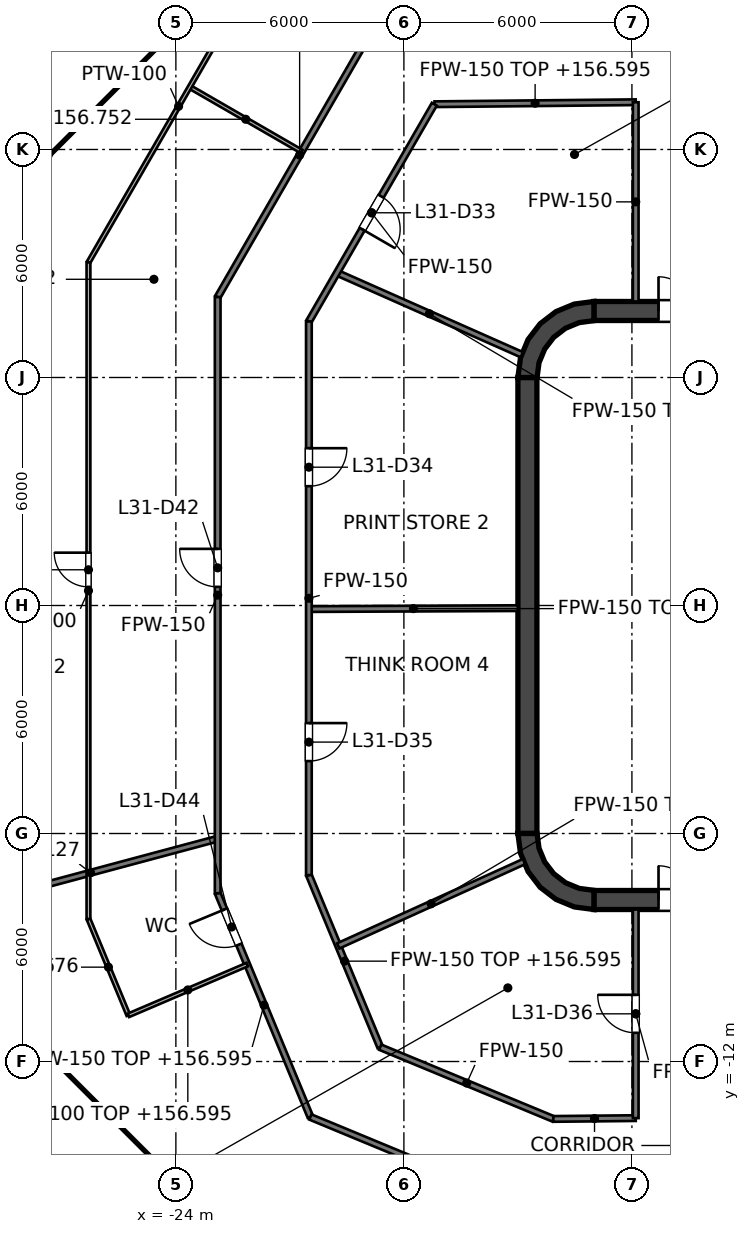
"""IFC4 building model, lengths in metres.
Left out: names, types, materials, properties, quantities, classifications, styles, units other than length and angle.
Written with IfcOpenShell. Run it as: python <this file> out.ifc"""

import sys

from ifc_helpers import new_model, si_unit, direction, frame, frame_2d, origin, place, context, subcontext, project, spatial, polyline, rectangle, outline, extrude, element, fill, save


model = new_model("IFC4")
c1 = context("Model", 3, precision=1e-05, world=origin(), true_north=direction((0.0, 1.0)))
c2 = subcontext(c1, "Body", "Model", "MODEL_VIEW")
j1 = project(units=[si_unit("LENGTHUNIT", "METRE"), si_unit("PLANEANGLEUNIT", "RADIAN")], contexts=[c1])
p1 = place(None, origin())
s1 = spatial("IfcSite", under=j1, at=p1, CompositionType="ELEMENT")
p2 = place(p1, origin())
s2 = spatial("IfcBuilding", under=s1, at=p2, CompositionType="ELEMENT")
p3 = place(p2, frame((0.0, 0.0, 153.6)))
s3 = spatial("IfcBuildingStorey", under=s2, at=p3, CompositionType="ELEMENT", Elevation=153.6)
p4 = place(p3, frame((-13.0, 7.75, 0.0), z_axis=(0.0, 0.0, 1.0), x_axis=(1.0, 0.0, 0.0)))
e1 = element("IfcWall", 1, at=p4, inside=s3, PredefinedType="SHEAR", context=c2, shape_type="SweptSolid", body=[
    extrude(rectangle(XDim=26.0, YDim=0.5, at=frame_2d((13.0, 0.0))), origin(), (0.0, 0.0, 1.0), 4.0),
])
p5 = place(p4, frame((1.7, 0.0, 0.0)))
e2 = element("IfcOpeningElement", 2, at=p5, cuts=e1, PredefinedType="OPENING", context=c2, shape_type="SweptSolid", body=[
    extrude(rectangle(XDim=1.8, YDim=2.1, at=frame_2d((0.9, 1.05))), frame((0.0, 0.25, 0.0), z_axis=(0.0, -1.0, 0.0), x_axis=(1.0, 0.0, 0.0)), (0.0, 0.0, 1.0), 0.5),
])
p6 = place(p4, frame((22.5, 0.0, 0.0)))
e3 = element("IfcOpeningElement", 3, at=p6, cuts=e1, PredefinedType="OPENING", context=c2, shape_type="SweptSolid", body=[
    extrude(rectangle(XDim=1.8, YDim=2.1, at=frame_2d((0.9, 1.05))), frame((0.0, 0.25, 0.0), z_axis=(0.0, -1.0, 0.0), x_axis=(1.0, 0.0, 0.0)), (0.0, 0.0, 1.0), 0.5),
])
p7 = place(p3, frame((-13.0, -7.75, 0.0), z_axis=(0.0, 0.0, 1.0), x_axis=(1.0, 0.0, 0.0)))
e4 = element("IfcWall", 4, at=p7, inside=s3, PredefinedType="SHEAR", context=c2, shape_type="SweptSolid", body=[
    extrude(rectangle(XDim=26.0, YDim=0.5, at=frame_2d((13.0, 0.0))), origin(), (0.0, 0.0, 1.0), 4.0),
])
p8 = place(p7, frame((1.7, 0.0, 0.0)))
e5 = element("IfcOpeningElement", 5, at=p8, cuts=e4, PredefinedType="OPENING", context=c2, shape_type="SweptSolid", body=[
    extrude(rectangle(XDim=1.8, YDim=2.1, at=frame_2d((0.9, 1.05))), frame((0.0, 0.25, 0.0), z_axis=(0.0, -1.0, 0.0), x_axis=(1.0, 0.0, 0.0)), (0.0, 0.0, 1.0), 0.5),
])
p9 = place(p7, frame((22.5, 0.0, 0.0)))
e6 = element("IfcOpeningElement", 6, at=p9, cuts=e4, PredefinedType="OPENING", context=c2, shape_type="SweptSolid", body=[
    extrude(rectangle(XDim=1.8, YDim=2.1, at=frame_2d((0.9, 1.05))), frame((0.0, 0.25, 0.0), z_axis=(0.0, -1.0, 0.0), x_axis=(1.0, 0.0, 0.0)), (0.0, 0.0, 1.0), 0.5),
])
p10 = place(p3, frame((-14.75, -6.0, 0.0), z_axis=(0.0, 0.0, 1.0), x_axis=(0.0, 1.0, 0.0)))
e7 = element("IfcWall", 7, at=p10, inside=s3, PredefinedType="SHEAR", context=c2, shape_type="SweptSolid", body=[
    extrude(rectangle(XDim=12.0, YDim=0.5, at=frame_2d((6.0, 0.0))), origin(), (0.0, 0.0, 1.0), 4.0),
])
p11 = place(p3, origin())
e8 = element("IfcWall", 8, at=p11, inside=s3, PredefinedType="SHEAR", context=c2, shape_type="SweptSolid", body=[
    extrude(outline(polyline([(-15.0, 6.0), (-14.496, 6.0), (-14.445, 6.387), (-14.295, 6.748), (-14.058, 7.058), (-13.748, 7.295), (-13.387, 7.445), (-13.0, 7.496), (-13.0, 8.0), (-13.518, 7.932), (-14.0, 7.732), (-14.414, 7.414), (-14.732, 7.0), (-14.932, 6.518), (-15.0, 6.0)])), origin(), (0.0, 0.0, 1.0), 4.0),
])
e9 = element("IfcWall", 9, at=p11, inside=s3, PredefinedType="SHEAR", context=c2, shape_type="SweptSolid", body=[
    extrude(outline(polyline([(-13.0, -8.0), (-13.0, -7.496), (-13.387, -7.445), (-13.748, -7.295), (-14.058, -7.058), (-14.295, -6.748), (-14.445, -6.387), (-14.496, -6.0), (-15.0, -6.0), (-14.932, -6.518), (-14.732, -7.0), (-14.414, -7.414), (-14.0, -7.732), (-13.518, -7.932), (-13.0, -8.0)])), origin(), (0.0, 0.0, 1.0), 4.0),
])
p12 = place(p3, frame((-11.8, -7.5, 0.0), z_axis=(0.0, 0.0, 1.0), x_axis=(0.0, 1.0, 0.0)))
e10 = element("IfcWall", 10, at=p12, inside=s3, PredefinedType="SOLIDWALL", context=c2, shape_type="SweptSolid", body=[
    extrude(rectangle(XDim=15.0, YDim=0.4, at=frame_2d((7.5, 0.0))), origin(), (0.0, 0.0, 1.0), 3.85),
])
p13 = place(p12, frame((11.3, 0.0, 0.0)))
e11 = element("IfcOpeningElement", 11, at=p13, cuts=e10, PredefinedType="OPENING", context=c2, shape_type="SweptSolid", body=[
    extrude(rectangle(XDim=1.1, YDim=2.1, at=frame_2d((0.55, 1.05))), frame((0.0, 0.2, 0.0), z_axis=(0.0, -1.0, 0.0), x_axis=(1.0, 0.0, 0.0)), (0.0, 0.0, 1.0), 0.4),
])
p14 = place(p12, frame((8.4, 0.0, 0.0)))
e12 = element("IfcOpeningElement", 12, at=p14, cuts=e10, PredefinedType="OPENING", context=c2, shape_type="SweptSolid", body=[
    extrude(rectangle(XDim=1.1, YDim=2.1, at=frame_2d((0.55, 1.05))), frame((0.0, 0.2, 0.0), z_axis=(0.0, -1.0, 0.0), x_axis=(1.0, 0.0, 0.0)), (0.0, 0.0, 1.0), 0.4),
])
p15 = place(p12, frame((5.5, 0.0, 0.0)))
e13 = element("IfcOpeningElement", 13, at=p15, cuts=e10, PredefinedType="OPENING", context=c2, shape_type="SweptSolid", body=[
    extrude(rectangle(XDim=1.1, YDim=2.1, at=frame_2d((0.55, 1.05))), frame((0.0, 0.2, 0.0), z_axis=(0.0, -1.0, 0.0), x_axis=(1.0, 0.0, 0.0)), (0.0, 0.0, 1.0), 0.4),
])
p16 = place(p12, frame((13.697, 0.0, 0.0)))
e14 = element("IfcOpeningElement", 14, at=p16, cuts=e10, PredefinedType="OPENING", context=c2, shape_type="SweptSolid", body=[
    extrude(rectangle(XDim=0.9, YDim=2.1, at=frame_2d((0.45, 1.05))), frame((0.0, 0.2, 0.0), z_axis=(0.0, -1.0, 0.0), x_axis=(1.0, 0.0, 0.0)), (0.0, 0.0, 1.0), 0.4),
])
p17 = place(p12, frame((0.403, 0.0, 0.0)))
e15 = element("IfcOpeningElement", 15, at=p17, cuts=e10, PredefinedType="OPENING", context=c2, shape_type="SweptSolid", body=[
    extrude(rectangle(XDim=0.9, YDim=2.1, at=frame_2d((0.45, 1.05))), frame((0.0, 0.2, 0.0), z_axis=(0.0, -1.0, 0.0), x_axis=(1.0, 0.0, 0.0)), (0.0, 0.0, 1.0), 0.4),
])
e16 = element("IfcWall", 16, at=p11, inside=s3, PredefinedType="SOLIDWALL", context=c2, shape_type="SweptSolid", body=[
    extrude(outline(polyline([(-12.0, -5.925), (-12.0, -5.675), (-14.25, -5.675), (-14.25, -3.025), (-12.0, -3.025), (-12.0, -2.775), (-14.25, -2.775), (-14.25, -0.125), (-12.0, -0.125), (-12.0, 0.125), (-14.25, 0.125), (-14.25, 2.775), (-12.0, 2.775), (-12.0, 3.025), (-14.25, 3.025), (-14.25, 5.675), (-12.0, 5.675), (-12.0, 5.925), (-14.25, 5.925), (-14.5, 5.925), (-14.5, 5.675), (-14.5, 3.025), (-14.5, 2.775), (-14.5, 0.125), (-14.5, -0.125), (-14.5, -2.775), (-14.5, -3.025), (-14.5, -5.675), (-14.5, -5.925), (-14.25, -5.925), (-12.0, -5.925)])), origin(), (0.0, 0.0, 1.0), 3.85),
])
p18 = place(p3, frame((-22.9, -7.572, 0.0), z_axis=(0.0, 0.0, 1.0), x_axis=(0.382860357704, -0.923806227788, 0.0)))
e17 = element("IfcWall", 17, at=p18, inside=s3, PredefinedType="PARTITIONING", context=c2, shape_type="SweptSolid", body=[
    extrude(rectangle(XDim=6.374, YDim=0.15, at=frame_2d((3.187, 0.0))), origin(), (0.0, 0.0, 1.0), 2.995),
])
p19 = place(p18, frame((0.462, 0.0, 0.0)))
e18 = element("IfcOpeningElement", 18, at=p19, cuts=e17, PredefinedType="OPENING", context=c2, shape_type="SweptSolid", body=[
    extrude(rectangle(XDim=1.0, YDim=2.1, at=frame_2d((0.5, 1.05))), frame((0.0, 0.075, 0.0), z_axis=(0.0, -1.0, 0.0), x_axis=(1.0, 0.0, 0.0)), (0.0, 0.0, 1.0), 0.15),
])
p20 = place(p3, frame((-20.5, -7.095, 0.0), z_axis=(0.0, 0.0, 1.0), x_axis=(0.382878184095, -0.923798839653, 0.0)))
e19 = element("IfcWall", 19, at=p20, inside=s3, PredefinedType="PARTITIONING", context=c2, shape_type="SweptSolid", body=[
    extrude(rectangle(XDim=4.902, YDim=0.15, at=frame_2d((2.451, 0.0))), origin(), (0.0, 0.0, 1.0), 2.995),
])
p21 = place(p3, frame((-19.76, 8.755, 0.0), z_axis=(0.0, 0.0, 1.0), x_axis=(0.91424834547, -0.405154245695, 0.0)))
e20 = element("IfcWall", 20, at=p21, inside=s3, PredefinedType="PARTITIONING", context=c2, shape_type="SweptSolid", body=[
    extrude(rectangle(XDim=5.318, YDim=0.15, at=frame_2d((2.659, 0.0))), origin(), (0.0, 0.0, 1.0), 2.995),
])
p22 = place(p3, frame((-20.46, -13.46, 0.0), z_axis=(0.0, 0.0, 1.0), x_axis=(0.923801547606, -0.382871650349, 0.0)))
e21 = element("IfcWall", 21, at=p22, inside=s3, PredefinedType="PARTITIONING", context=c2, shape_type="SweptSolid", body=[
    extrude(rectangle(XDim=6.415, YDim=0.15, at=frame_2d((3.208, 0.0))), origin(), (0.0, 0.0, 1.0), 2.927),
])
p23 = place(p3, frame((-18.623, -11.623, 0.0), z_axis=(0.0, 0.0, 1.0), x_axis=(0.923791670587, -0.38289548098, 0.0)))
e22 = element("IfcWall", 22, at=p23, inside=s3, PredefinedType="PARTITIONING", context=c2, shape_type="SweptSolid", body=[
    extrude(rectangle(XDim=4.931, YDim=0.15, at=frame_2d((2.465, 0.0))), origin(), (0.0, 0.0, 1.0), 2.927),
])
p24 = place(p3, frame((-20.5, -0.094, 0.0), z_axis=(0.0, 0.0, 1.0), x_axis=(0.999990148138, 0.004438876723, 0.0)))
e23 = element("IfcWall", 23, at=p24, inside=s3, PredefinedType="PARTITIONING", context=c2, shape_type="SweptSolid", body=[
    extrude(rectangle(XDim=5.5, YDim=0.15, at=frame_2d((2.75, 0.0))), origin(), (0.0, 0.0, 1.0), 2.995),
])
p25 = place(p3, frame((-14.068, -13.511, 0.0), z_axis=(0.0, 0.0, 1.0), x_axis=(0.999950911515, 0.009908307647, 0.0)))
e24 = element("IfcWall", 24, at=p25, inside=s3, PredefinedType="PARTITIONING", context=c2, shape_type="SweptSolid", body=[
    extrude(rectangle(XDim=2.168, YDim=0.15, at=frame_2d((1.084, 0.0))), origin(), (0.0, 0.0, 1.0), 2.995),
])
p26 = place(p3, frame((-17.194, 13.191, 0.0), z_axis=(0.0, 0.0, 1.0), x_axis=(0.999950853109, 0.009914200296, 0.0)))
e25 = element("IfcWall", 25, at=p26, inside=s3, PredefinedType="PARTITIONING", context=c2, shape_type="SweptSolid", body=[
    extrude(rectangle(XDim=5.294, YDim=0.15, at=frame_2d((2.647, 0.0))), origin(), (0.0, 0.0, 1.0), 2.995),
])
p27 = place(p3, frame((-29.591, -7.929, 0.0), z_axis=(0.0, 0.0, 1.0), x_axis=(0.965923037728, 0.258829451931, 0.0)))
e26 = element("IfcWall", 26, at=p27, inside=s3, PredefinedType="PARTITIONING", context=c2, shape_type="SweptSolid", body=[
    extrude(rectangle(XDim=6.927, YDim=0.15, at=frame_2d((3.464, 0.0))), origin(), (0.0, 0.0, 1.0), 3.527),
])
p28 = place(p3, frame((-19.728, -8.958, 0.0), z_axis=(0.0, 0.0, 1.0), x_axis=(0.910629511797, 0.413223779863, 0.0)))
e27 = element("IfcWall", 27, at=p28, inside=s3, PredefinedType="PARTITIONING", context=c2, shape_type="SweptSolid", body=[
    extrude(rectangle(XDim=5.368, YDim=0.15, at=frame_2d((2.684, 0.0))), origin(), (0.0, 0.0, 1.0), 3.85),
])
p29 = place(p3, frame((-20.5, 7.474, 0.0), z_axis=(0.0, 0.0, 1.0), x_axis=(0.500012665616, 0.866018091164, 0.0)))
e28 = element("IfcWall", 28, at=p29, inside=s3, PredefinedType="PARTITIONING", context=c2, shape_type="SweptSolid", body=[
    extrude(rectangle(XDim=6.602, YDim=0.15, at=frame_2d((3.301, 0.0))), origin(), (0.0, 0.0, 1.0), 2.927),
])
p30 = place(p29, frame((2.803, 0.0, 0.0)))
e29 = element("IfcOpeningElement", 29, at=p30, cuts=e28, PredefinedType="OPENING", context=c2, shape_type="SweptSolid", body=[
    extrude(rectangle(XDim=1.0, YDim=2.1, at=frame_2d((0.5, 1.05))), frame((0.0, 0.075, 0.0), z_axis=(0.0, -1.0, 0.0), x_axis=(1.0, 0.0, 0.0)), (0.0, 0.0, 1.0), 0.15),
])
p31 = place(p3, frame((-22.9, 8.117, 0.0), z_axis=(0.0, 0.0, 1.0), x_axis=(0.5000050195, 0.866022505755, 0.0)))
e30 = element("IfcWall", 30, at=p31, inside=s3, PredefinedType="PARTITIONING", context=c2, shape_type="SweptSolid", body=[
    extrude(rectangle(XDim=8.626, YDim=0.15, at=frame_2d((4.313, 0.0))), origin(), (0.0, 0.0, 1.0), 2.927),
])
p32 = place(p3, frame((-11.9, -13.49, 0.0), z_axis=(0.0, 0.0, 1.0), x_axis=(0.0, 1.0, 0.0)))
e31 = element("IfcWall", 31, at=p32, inside=s3, PredefinedType="PARTITIONING", context=c2, shape_type="SweptSolid", body=[
    extrude(rectangle(XDim=5.49, YDim=0.15, at=frame_2d((2.745, 0.0))), origin(), (0.0, 0.0, 1.0), 2.927),
])
p33 = place(p32, frame((2.245, 0.0, 0.0)))
e32 = element("IfcOpeningElement", 32, at=p33, cuts=e31, PredefinedType="OPENING", context=c2, shape_type="SweptSolid", body=[
    extrude(rectangle(XDim=1.0, YDim=2.1, at=frame_2d((0.5, 1.05))), frame((0.0, 0.075, 0.0), z_axis=(0.0, -1.0, 0.0), x_axis=(1.0, 0.0, 0.0)), (0.0, 0.0, 1.0), 0.15),
])
p34 = place(p3, frame((-11.9, 8.0, 0.0), z_axis=(0.0, 0.0, 1.0), x_axis=(0.0, 1.0, 0.0)))
e33 = element("IfcWall", 33, at=p34, inside=s3, PredefinedType="PARTITIONING", context=c2, shape_type="SweptSolid", body=[
    extrude(rectangle(XDim=5.243, YDim=0.15, at=frame_2d((2.622, 0.0))), origin(), (0.0, 0.0, 1.0), 2.927),
])
p35 = place(p3, frame((-20.5, -7.095, 0.0), z_axis=(0.0, 0.0, 1.0), x_axis=(0.0, 1.0, 0.0)))
e34 = element("IfcWall", 34, at=p35, inside=s3, PredefinedType="PARTITIONING", context=c2, shape_type="SweptSolid", body=[
    extrude(rectangle(XDim=14.569, YDim=0.15, at=frame_2d((7.285, 0.0))), origin(), (0.0, 0.0, 1.0), 2.927),
])
p36 = place(p35, frame((10.234, 0.0, 0.0)))
e35 = element("IfcOpeningElement", 35, at=p36, cuts=e34, PredefinedType="OPENING", context=c2, shape_type="SweptSolid", body=[
    extrude(rectangle(XDim=1.0, YDim=2.1, at=frame_2d((0.5, 1.05))), frame((0.0, 0.075, 0.0), z_axis=(0.0, -1.0, 0.0), x_axis=(1.0, 0.0, 0.0)), (0.0, 0.0, 1.0), 0.15),
])
p37 = place(p35, frame((3.0, 0.0, 0.0)))
e36 = element("IfcOpeningElement", 36, at=p37, cuts=e34, PredefinedType="OPENING", context=c2, shape_type="SweptSolid", body=[
    extrude(rectangle(XDim=1.0, YDim=2.1, at=frame_2d((0.5, 1.05))), frame((0.0, 0.075, 0.0), z_axis=(0.0, -1.0, 0.0), x_axis=(1.0, 0.0, 0.0)), (0.0, 0.0, 1.0), 0.15),
])
p38 = place(p3, frame((-22.9, -7.572, 0.0), z_axis=(0.0, 0.0, 1.0), x_axis=(0.0, 1.0, 0.0)))
e37 = element("IfcWall", 37, at=p38, inside=s3, PredefinedType="PARTITIONING", context=c2, shape_type="SweptSolid", body=[
    extrude(rectangle(XDim=15.689, YDim=0.15, at=frame_2d((7.844, 0.0))), origin(), (0.0, 0.0, 1.0), 2.927),
])
p39 = place(p38, frame((8.062, 0.0, 0.0)))
e38 = element("IfcOpeningElement", 38, at=p39, cuts=e37, PredefinedType="OPENING", context=c2, shape_type="SweptSolid", body=[
    extrude(rectangle(XDim=1.0, YDim=2.1, at=frame_2d((0.5, 1.05))), frame((0.0, 0.075, 0.0), z_axis=(0.0, -1.0, 0.0), x_axis=(1.0, 0.0, 0.0)), (0.0, 0.0, 1.0), 0.15),
])
p40 = place(p3, frame((-26.3, -8.249, 0.0), z_axis=(0.0, 0.0, 1.0), x_axis=(0.382878044957, -0.92379889732, 0.0)))
e39 = element("IfcWall", 39, at=p40, inside=s3, PredefinedType="PARTITIONING", context=c2, shape_type="SweptSolid", body=[
    extrude(rectangle(XDim=2.745, YDim=0.1, at=frame_2d((1.373, 0.0))), origin(), (0.0, 0.0, 1.0), 3.076),
])
p41 = place(p3, frame((-23.634, 13.645, 0.0), z_axis=(0.0, 0.0, 1.0), x_axis=(0.866002606077, -0.500039484709, 0.0)))
e40 = element("IfcWall", 40, at=p41, inside=s3, PredefinedType="PARTITIONING", context=c2, shape_type="SweptSolid", body=[
    extrude(rectangle(XDim=3.4, YDim=0.1, at=frame_2d((1.7, 0.0))), origin(), (0.0, 0.0, 1.0), 3.152),
])
p42 = place(p3, frame((-25.249, -10.785, 0.0), z_axis=(0.0, 0.0, 1.0), x_axis=(0.919590085221, 0.392879211925, 0.0)))
e41 = element("IfcWall", 41, at=p42, inside=s3, PredefinedType="PARTITIONING", context=c2, shape_type="SweptSolid", body=[
    extrude(rectangle(XDim=3.4, YDim=0.1, at=frame_2d((1.7, 0.0))), origin(), (0.0, 0.0, 1.0), 2.995),
])
p43 = place(p3, frame((-26.3, 9.028, 0.0), z_axis=(0.0, 0.0, 1.0), x_axis=(0.499994996542, 0.866028292513, 0.0)))
e42 = element("IfcWall", 42, at=p43, inside=s3, PredefinedType="PARTITIONING", context=c2, shape_type="SweptSolid", body=[
    extrude(rectangle(XDim=9.486, YDim=0.1, at=frame_2d((4.743, 0.0))), origin(), (0.0, 0.0, 1.0), 2.927),
])
p44 = place(p3, frame((-26.3, -8.249, 0.0), z_axis=(0.0, 0.0, 1.0), x_axis=(0.0, 1.0, 0.0)))
e43 = element("IfcWall", 43, at=p44, inside=s3, PredefinedType="PARTITIONING", context=c2, shape_type="SweptSolid", body=[
    extrude(rectangle(XDim=17.277, YDim=0.1, at=frame_2d((8.639, 0.0))), origin(), (0.0, 0.0, 1.0), 2.927),
])
p45 = place(p44, frame((8.739, 0.0, 0.0)))
e44 = element("IfcOpeningElement", 44, at=p45, cuts=e43, PredefinedType="OPENING", context=c2, shape_type="SweptSolid", body=[
    extrude(rectangle(XDim=0.9, YDim=2.1, at=frame_2d((0.45, 1.05))), frame((0.0, 0.05, 0.0), z_axis=(0.0, -1.0, 0.0), x_axis=(1.0, 0.0, 0.0)), (0.0, 0.0, 1.0), 0.1),
])
p46 = place(p13, origin())
e45 = element("IfcDoor", 45, at=p46, inside=s3, OperationType="DOUBLE_DOOR_SLIDING", PredefinedType="DOOR", context=c2, shape_type="SweptSolid", body=[
    extrude(rectangle(XDim=1.1, YDim=2.1, at=frame_2d((0.55, 1.05))), frame((0.0, 0.025, 0.0), z_axis=(0.0, -1.0, 0.0), x_axis=(1.0, 0.0, 0.0)), (0.0, 0.0, 1.0), 0.05),
])
fill(e11, e45)
p47 = place(p14, origin())
e46 = element("IfcDoor", 46, at=p47, inside=s3, OperationType="DOUBLE_DOOR_SLIDING", PredefinedType="DOOR", context=c2, shape_type="SweptSolid", body=[
    extrude(rectangle(XDim=1.1, YDim=2.1, at=frame_2d((0.55, 1.05))), frame((0.0, 0.025, 0.0), z_axis=(0.0, -1.0, 0.0), x_axis=(1.0, 0.0, 0.0)), (0.0, 0.0, 1.0), 0.05),
])
fill(e12, e46)
p48 = place(p15, origin())
e47 = element("IfcDoor", 47, at=p48, inside=s3, OperationType="DOUBLE_DOOR_SLIDING", PredefinedType="DOOR", context=c2, shape_type="SweptSolid", body=[
    extrude(rectangle(XDim=1.1, YDim=2.1, at=frame_2d((0.55, 1.05))), frame((0.0, 0.025, 0.0), z_axis=(0.0, -1.0, 0.0), x_axis=(1.0, 0.0, 0.0)), (0.0, 0.0, 1.0), 0.05),
])
fill(e13, e47)
p49 = place(p16, origin())
e48 = element("IfcDoor", 48, at=p49, inside=s3, OperationType="SINGLE_SWING_LEFT", PredefinedType="DOOR", context=c2, shape_type="SweptSolid", body=[
    extrude(rectangle(XDim=0.9, YDim=2.1, at=frame_2d((0.45, 1.05))), frame((0.0, 0.025, 0.0), z_axis=(0.0, -1.0, 0.0), x_axis=(1.0, 0.0, 0.0)), (0.0, 0.0, 1.0), 0.05),
])
fill(e14, e48)
p50 = place(p17, origin())
e49 = element("IfcDoor", 49, at=p50, inside=s3, OperationType="SINGLE_SWING_LEFT", PredefinedType="DOOR", context=c2, shape_type="SweptSolid", body=[
    extrude(rectangle(XDim=0.9, YDim=2.1, at=frame_2d((0.45, 1.05))), frame((0.0, 0.025, 0.0), z_axis=(0.0, -1.0, 0.0), x_axis=(1.0, 0.0, 0.0)), (0.0, 0.0, 1.0), 0.05),
])
fill(e15, e49)
p51 = place(p5, origin())
e50 = element("IfcDoor", 50, at=p51, inside=s3, OperationType="DOUBLE_DOOR_SINGLE_SWING", PredefinedType="DOOR", context=c2, shape_type="SweptSolid", body=[
    extrude(rectangle(XDim=1.8, YDim=2.1, at=frame_2d((0.9, 1.05))), frame((0.0, 0.025, 0.0), z_axis=(0.0, -1.0, 0.0), x_axis=(1.0, 0.0, 0.0)), (0.0, 0.0, 1.0), 0.05),
])
fill(e2, e50)
p52 = place(p8, origin())
e51 = element("IfcDoor", 51, at=p52, inside=s3, OperationType="DOUBLE_DOOR_SINGLE_SWING", PredefinedType="DOOR", context=c2, shape_type="SweptSolid", body=[
    extrude(rectangle(XDim=1.8, YDim=2.1, at=frame_2d((0.9, 1.05))), frame((0.0, 0.025, 0.0), z_axis=(0.0, -1.0, 0.0), x_axis=(1.0, 0.0, 0.0)), (0.0, 0.0, 1.0), 0.05),
])
fill(e5, e51)
p53 = place(p30, origin())
e52 = element("IfcDoor", 52, at=p53, inside=s3, OperationType="SINGLE_SWING_LEFT", PredefinedType="DOOR", context=c2, shape_type="SweptSolid", body=[
    extrude(rectangle(XDim=1.0, YDim=2.1, at=frame_2d((0.5, 1.05))), frame((0.0, 0.025, 0.0), z_axis=(0.0, -1.0, 0.0), x_axis=(1.0, 0.0, 0.0)), (0.0, 0.0, 1.0), 0.05),
])
fill(e29, e52)
p54 = place(p36, origin())
e53 = element("IfcDoor", 53, at=p54, inside=s3, OperationType="SINGLE_SWING_RIGHT", PredefinedType="DOOR", context=c2, shape_type="SweptSolid", body=[
    extrude(rectangle(XDim=1.0, YDim=2.1, at=frame_2d((0.5, 1.05))), frame((0.0, 0.025, 0.0), z_axis=(0.0, -1.0, 0.0), x_axis=(1.0, 0.0, 0.0)), (0.0, 0.0, 1.0), 0.05),
])
fill(e35, e53)
p55 = place(p37, origin())
e54 = element("IfcDoor", 54, at=p55, inside=s3, OperationType="SINGLE_SWING_RIGHT", PredefinedType="DOOR", context=c2, shape_type="SweptSolid", body=[
    extrude(rectangle(XDim=1.0, YDim=2.1, at=frame_2d((0.5, 1.05))), frame((0.0, 0.025, 0.0), z_axis=(0.0, -1.0, 0.0), x_axis=(1.0, 0.0, 0.0)), (0.0, 0.0, 1.0), 0.05),
])
fill(e36, e54)
p56 = place(p33, origin())
e55 = element("IfcDoor", 55, at=p56, inside=s3, OperationType="SINGLE_SWING_RIGHT", PredefinedType="DOOR", context=c2, shape_type="SweptSolid", body=[
    extrude(rectangle(XDim=1.0, YDim=2.1, at=frame_2d((0.5, 1.05))), frame((0.0, 0.025, 0.0), z_axis=(0.0, -1.0, 0.0), x_axis=(1.0, 0.0, 0.0)), (0.0, 0.0, 1.0), 0.05),
])
fill(e32, e55)
p57 = place(p39, origin())
e56 = element("IfcDoor", 56, at=p57, inside=s3, OperationType="SINGLE_SWING_RIGHT", PredefinedType="DOOR", context=c2, shape_type="SweptSolid", body=[
    extrude(rectangle(XDim=1.0, YDim=2.1, at=frame_2d((0.5, 1.05))), frame((0.0, 0.025, 0.0), z_axis=(0.0, -1.0, 0.0), x_axis=(1.0, 0.0, 0.0)), (0.0, 0.0, 1.0), 0.05),
])
fill(e38, e56)
p58 = place(p45, origin())
e57 = element("IfcDoor", 57, at=p58, inside=s3, OperationType="SINGLE_SWING_RIGHT", PredefinedType="DOOR", context=c2, shape_type="SweptSolid", body=[
    extrude(rectangle(XDim=0.9, YDim=2.1, at=frame_2d((0.45, 1.05))), frame((0.0, 0.025, 0.0), z_axis=(0.0, -1.0, 0.0), x_axis=(1.0, 0.0, 0.0)), (0.0, 0.0, 1.0), 0.05),
])
fill(e44, e57)
p59 = place(p19, origin())
e58 = element("IfcDoor", 58, at=p59, inside=s3, OperationType="SINGLE_SWING_LEFT", PredefinedType="DOOR", context=c2, shape_type="SweptSolid", body=[
    extrude(rectangle(XDim=1.0, YDim=2.1, at=frame_2d((0.5, 1.05))), frame((0.0, 0.025, 0.0), z_axis=(0.0, -1.0, 0.0), x_axis=(1.0, 0.0, 0.0)), (0.0, 0.0, 1.0), 0.05),
])
fill(e18, e58)
save(model, sys.argv[1])
